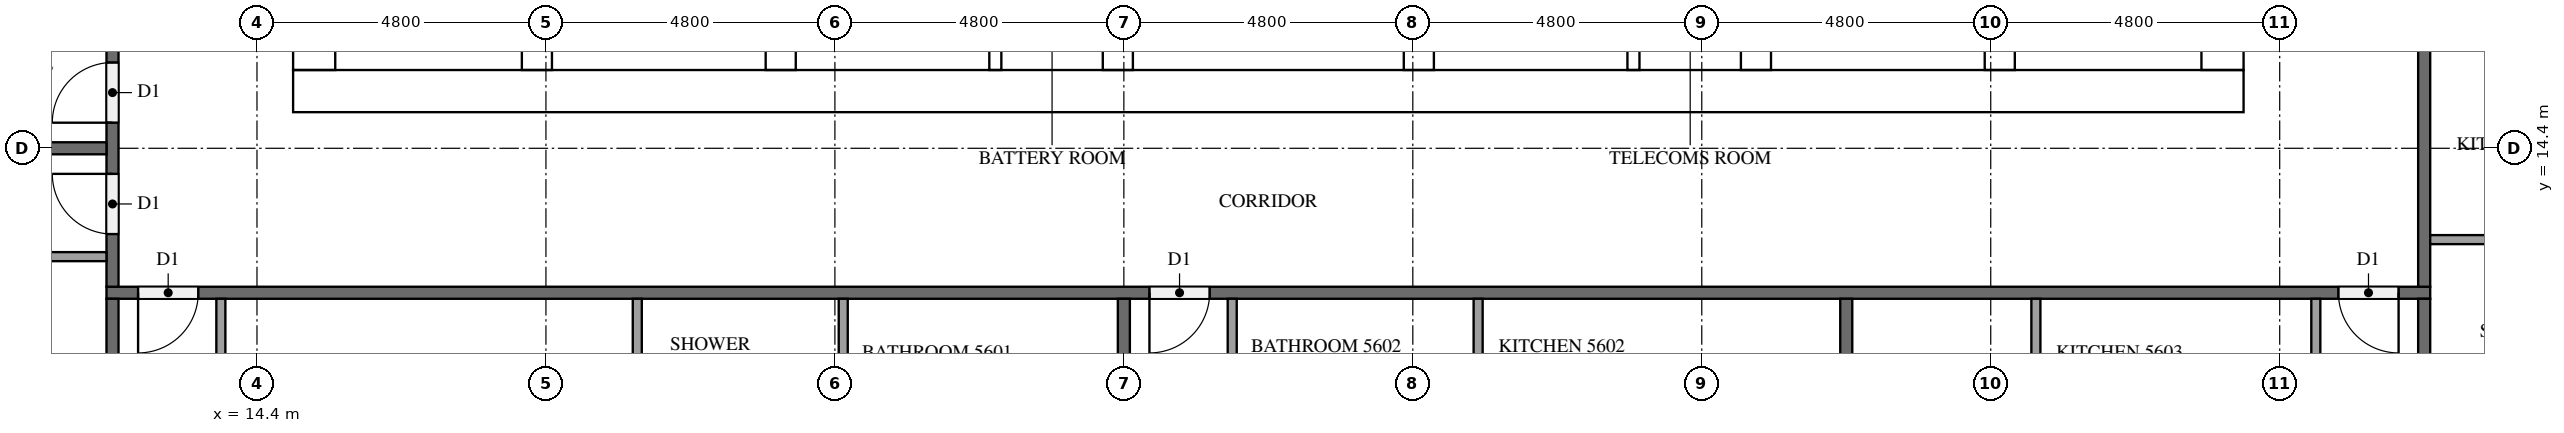
"""IFC4 building model, lengths in metres.
Left out: names, types, materials, properties, quantities, classifications, styles, units other than length and angle.
Written with IfcOpenShell. Run it as: python <this file> out.ifc"""

import sys

from ifc_helpers import new_model, si_unit, direction, frame, frame_2d, origin, place, context, subcontext, project, spatial, rectangle, extrude, element, fill, save


model = new_model("IFC4")
c1 = context("Model", 3, precision=1e-05, world=origin(), true_north=direction((0.0, 1.0)))
c2 = subcontext(c1, "Body", "Model", "MODEL_VIEW")
j1 = project(units=[si_unit("LENGTHUNIT", "METRE"), si_unit("PLANEANGLEUNIT", "RADIAN")], contexts=[c1])
p1 = place(None, origin())
s1 = spatial("IfcSite", under=j1, at=p1, CompositionType="ELEMENT")
p2 = place(p1, origin())
s2 = spatial("IfcBuilding", under=s1, at=p2, CompositionType="ELEMENT")
p3 = place(p2, frame((0.0, 0.0, 215.8)))
s3 = spatial("IfcBuildingStorey", under=s2, at=p3, CompositionType="ELEMENT", Elevation=215.8)
p4 = place(p3, frame((15.0, 15.35, 0.0), z_axis=(0.0, 0.0, 1.0), x_axis=(1.0, 0.0, 0.0)))
e1 = element("IfcWall", 1, at=p4, inside=s3, PredefinedType="SHEAR", context=c2, shape_type="SweptSolid", body=[
    extrude(rectangle(XDim=32.4, YDim=0.7, at=frame_2d((16.2, 0.0))), origin(), (0.0, 0.0, 1.0), 3.2),
])
p5 = place(p4, frame((15.3, 0.0, 0.0)))
e2 = element("IfcOpeningElement", 2, at=p5, cuts=e1, PredefinedType="OPENING", context=c2, shape_type="SweptSolid", body=[
    extrude(rectangle(XDim=1.8, YDim=2.1, at=frame_2d((0.9, 1.05))), frame((0.0, 0.36, 0.0), z_axis=(0.0, -1.0, 0.0), x_axis=(1.0, 0.0, 0.0)), (0.0, 0.0, 1.0), 0.72),
])
p6 = place(p3, frame((15.35, 15.7, 0.0), z_axis=(0.0, 0.0, 1.0), x_axis=(0.0, 1.0, 0.0)))
e3 = element("IfcWall", 3, at=p6, inside=s3, PredefinedType="SHEAR", context=c2, shape_type="SweptSolid", body=[
    extrude(rectangle(XDim=21.4, YDim=0.7, at=frame_2d((10.7, 0.0))), origin(), (0.0, 0.0, 1.0), 3.2),
])
p7 = place(p6, frame((5.06, 0.0, 0.0)))
e4 = element("IfcOpeningElement", 4, at=p7, cuts=e3, PredefinedType="OPENING", context=c2, shape_type="SweptSolid", body=[
    extrude(rectangle(XDim=1.2, YDim=2.1, at=frame_2d((0.6, 1.05))), frame((0.0, 0.36, 0.0), z_axis=(0.0, -1.0, 0.0), x_axis=(1.0, 0.0, 0.0)), (0.0, 0.0, 1.0), 0.72),
])
p8 = place(p3, frame((47.05, 15.7, 0.0), z_axis=(0.0, 0.0, 1.0), x_axis=(0.0, 1.0, 0.0)))
e5 = element("IfcWall", 5, at=p8, inside=s3, PredefinedType="SHEAR", context=c2, shape_type="SweptSolid", body=[
    extrude(rectangle(XDim=21.4, YDim=0.7, at=frame_2d((10.7, 0.0))), origin(), (0.0, 0.0, 1.0), 3.2),
])
p9 = place(p8, frame((10.4, 0.0, 0.0)))
e6 = element("IfcOpeningElement", 6, at=p9, cuts=e5, PredefinedType="OPENING", context=c2, shape_type="SweptSolid", body=[
    extrude(rectangle(XDim=1.2, YDim=2.1, at=frame_2d((0.6, 1.05))), frame((0.0, 0.36, 0.0), z_axis=(0.0, -1.0, 0.0), x_axis=(1.0, 0.0, 0.0)), (0.0, 0.0, 1.0), 0.72),
])
p10 = place(p3, frame((19.05, 15.7, 0.0), z_axis=(0.0, 0.0, 1.0), x_axis=(0.0, 1.0, 0.0)))
e7 = element("IfcWall", 7, at=p10, inside=s3, PredefinedType="SHEAR", context=c2, shape_type="SweptSolid", body=[
    extrude(rectangle(XDim=15.3, YDim=0.5, at=frame_2d((7.65, 0.0))), origin(), (0.0, 0.0, 1.0), 3.2),
])
p11 = place(p10, frame((9.75, 0.0, 0.0)))
e8 = element("IfcOpeningElement", 8, at=p11, cuts=e7, PredefinedType="OPENING", context=c2, shape_type="SweptSolid", body=[
    extrude(rectangle(XDim=1.1, YDim=2.1, at=frame_2d((0.55, 1.05))), frame((0.0, 0.26, 0.0), z_axis=(0.0, -1.0, 0.0), x_axis=(1.0, 0.0, 0.0)), (0.0, 0.0, 1.0), 0.52),
])
p12 = place(p10, frame((13.25, 0.0, 0.0)))
e9 = element("IfcOpeningElement", 9, at=p12, cuts=e7, PredefinedType="OPENING", context=c2, shape_type="SweptSolid", body=[
    extrude(rectangle(XDim=1.1, YDim=2.1, at=frame_2d((0.55, 1.05))), frame((0.0, 0.26, 0.0), z_axis=(0.0, -1.0, 0.0), x_axis=(1.0, 0.0, 0.0)), (0.0, 0.0, 1.0), 0.52),
])
p13 = place(p10, frame((0.5, 0.0, 0.0)))
e10 = element("IfcOpeningElement", 10, at=p13, cuts=e7, PredefinedType="OPENING", context=c2, shape_type="SweptSolid", body=[
    extrude(rectangle(XDim=1.2, YDim=2.1, at=frame_2d((0.6, 1.05))), frame((0.0, 0.26, 0.0), z_axis=(0.0, -1.0, 0.0), x_axis=(1.0, 0.0, 0.0)), (0.0, 0.0, 1.0), 0.52),
])
p14 = place(p3, frame((23.1, 15.7, 0.0), z_axis=(0.0, 0.0, 1.0), x_axis=(0.0, 1.0, 0.0)))
e11 = element("IfcWall", 11, at=p14, inside=s3, PredefinedType="SHEAR", context=c2, shape_type="SweptSolid", body=[
    extrude(rectangle(XDim=21.4, YDim=0.5, at=frame_2d((10.7, 0.0))), origin(), (0.0, 0.0, 1.0), 3.2),
])
p15 = place(p3, frame((39.3, 15.7, 0.0), z_axis=(0.0, 0.0, 1.0), x_axis=(0.0, 1.0, 0.0)))
e12 = element("IfcWall", 12, at=p15, inside=s3, PredefinedType="SHEAR", context=c2, shape_type="SweptSolid", body=[
    extrude(rectangle(XDim=8.55, YDim=0.5, at=frame_2d((4.275, 0.0))), origin(), (0.0, 0.0, 1.0), 3.2),
])
p16 = place(p3, frame((43.35, 15.7, 0.0), z_axis=(0.0, 0.0, 1.0), x_axis=(0.0, 1.0, 0.0)))
e13 = element("IfcWall", 13, at=p16, inside=s3, PredefinedType="SHEAR", context=c2, shape_type="SweptSolid", body=[
    extrude(rectangle(XDim=8.55, YDim=0.5, at=frame_2d((4.275, 0.0))), origin(), (0.0, 0.0, 1.0), 3.2),
])
p17 = place(p16, frame((0.5, 0.0, 0.0)))
e14 = element("IfcOpeningElement", 14, at=p17, cuts=e13, PredefinedType="OPENING", context=c2, shape_type="SweptSolid", body=[
    extrude(rectangle(XDim=1.2, YDim=2.1, at=frame_2d((0.6, 1.05))), frame((0.0, 0.26, 0.0), z_axis=(0.0, -1.0, 0.0), x_axis=(1.0, 0.0, 0.0)), (0.0, 0.0, 1.0), 0.52),
])
for number, where, z_axis, x_axis in (
    (15, (28.7, 15.7, 0.0), (0.0, 0.0, 1.0), (0.0, 1.0, 0.0)),
    (16, (33.7, 15.7, 0.0), (0.0, 0.0, 1.0), (0.0, 1.0, 0.0)),
):
    element("IfcWall", number, at=place(p3, frame(where, z_axis=z_axis, x_axis=x_axis)), inside=s3, PredefinedType="SHEAR", context=c2, shape_type="SweptSolid", body=[
        extrude(rectangle(XDim=2.8, YDim=0.5, at=frame_2d((1.4, 0.0))), origin(), (0.0, 0.0, 1.0), 3.2),
    ])
for number, where, z_axis, x_axis in (
    (17, (26.665, 15.7, 0.0), (0.0, 0.0, 1.0), (0.0, 1.0, 0.0)),
    (18, (37.265, 15.7, 0.0), (0.0, 0.0, 1.0), (0.0, 1.0, 0.0)),
):
    element("IfcWall", number, at=place(p3, frame(where, z_axis=z_axis, x_axis=x_axis)), inside=s3, PredefinedType="PARTITIONING", context=c2, shape_type="SweptSolid", body=[
        extrude(rectangle(XDim=2.8, YDim=0.2, at=frame_2d((1.4, 0.0))), origin(), (0.0, 0.0, 1.0), 3.2),
    ])
p18 = place(p3, frame((50.5, 12.0, 0.0), z_axis=(0.0, 0.0, 1.0), x_axis=(-1.0, 0.0, 0.0)))
e19 = element("IfcWall", 19, at=p18, inside=s3, PredefinedType="PARTITIONING", context=c2, shape_type="SweptSolid", body=[
    extrude(rectangle(XDim=38.6, YDim=0.2, at=frame_2d((19.3, 0.0))), origin(), (0.0, 0.0, 1.0), 3.2),
])
p19 = place(p18, frame((37.075, 0.0, 0.0)))
e20 = element("IfcOpeningElement", 20, at=p19, cuts=e19, PredefinedType="OPENING", context=c2, shape_type="SweptSolid", body=[
    extrude(rectangle(XDim=1.0, YDim=2.1, at=frame_2d((0.5, 1.05))), frame((0.0, 0.11, 0.0), z_axis=(0.0, -1.0, 0.0), x_axis=(1.0, 0.0, 0.0)), (0.0, 0.0, 1.0), 0.22),
])
p20 = place(p18, frame((20.275, 0.0, 0.0)))
e21 = element("IfcOpeningElement", 21, at=p20, cuts=e19, PredefinedType="OPENING", context=c2, shape_type="SweptSolid", body=[
    extrude(rectangle(XDim=1.0, YDim=2.1, at=frame_2d((0.5, 1.05))), frame((0.0, 0.11, 0.0), z_axis=(0.0, -1.0, 0.0), x_axis=(1.0, 0.0, 0.0)), (0.0, 0.0, 1.0), 0.22),
])
p21 = place(p18, frame((0.525, 0.0, 0.0)))
e22 = element("IfcOpeningElement", 22, at=p21, cuts=e19, PredefinedType="OPENING", context=c2, shape_type="SweptSolid", body=[
    extrude(rectangle(XDim=1.0, YDim=2.1, at=frame_2d((0.5, 1.05))), frame((0.0, 0.11, 0.0), z_axis=(0.0, -1.0, 0.0), x_axis=(1.0, 0.0, 0.0)), (0.0, 0.0, 1.0), 0.22),
])
p22 = place(p3, frame((50.4, 40.7, 0.0), z_axis=(0.0, 0.0, 1.0), x_axis=(0.0, -1.0, 0.0)))
e23 = element("IfcWall", 23, at=p22, inside=s3, PredefinedType="PARTITIONING", context=c2, shape_type="SweptSolid", body=[
    extrude(rectangle(XDim=28.6, YDim=0.2, at=frame_2d((14.3, 0.0))), origin(), (0.0, 0.0, 1.0), 3.2),
])
p23 = place(p22, frame((19.525, 0.0, 0.0)))
e24 = element("IfcOpeningElement", 24, at=p23, cuts=e23, PredefinedType="OPENING", context=c2, shape_type="SweptSolid", body=[
    extrude(rectangle(XDim=1.0, YDim=2.1, at=frame_2d((0.5, 1.05))), frame((0.0, 0.11, 0.0), z_axis=(0.0, -1.0, 0.0), x_axis=(1.0, 0.0, 0.0)), (0.0, 0.0, 1.0), 0.22),
])
p24 = place(p22, frame((7.525, 0.0, 0.0)))
e25 = element("IfcOpeningElement", 25, at=p24, cuts=e23, PredefinedType="OPENING", context=c2, shape_type="SweptSolid", body=[
    extrude(rectangle(XDim=1.0, YDim=2.1, at=frame_2d((0.5, 1.05))), frame((0.0, 0.11, 0.0), z_axis=(0.0, -1.0, 0.0), x_axis=(1.0, 0.0, 0.0)), (0.0, 0.0, 1.0), 0.22),
])
p25 = place(p22, frame((0.325, 0.0, 0.0)))
e26 = element("IfcOpeningElement", 26, at=p25, cuts=e23, PredefinedType="OPENING", context=c2, shape_type="SweptSolid", body=[
    extrude(rectangle(XDim=1.0, YDim=2.1, at=frame_2d((0.5, 1.05))), frame((0.0, 0.11, 0.0), z_axis=(0.0, -1.0, 0.0), x_axis=(1.0, 0.0, 0.0)), (0.0, 0.0, 1.0), 0.22),
])
p26 = place(p3, frame((12.0, 12.1, 0.0), z_axis=(0.0, 0.0, 1.0), x_axis=(0.0, 1.0, 0.0)))
e27 = element("IfcWall", 27, at=p26, inside=s3, PredefinedType="PARTITIONING", context=c2, shape_type="SweptSolid", body=[
    extrude(rectangle(XDim=28.6, YDim=0.2, at=frame_2d((14.3, 0.0))), origin(), (0.0, 0.0, 1.0), 3.2),
])
p27 = place(p26, frame((27.275, 0.0, 0.0)))
e28 = element("IfcOpeningElement", 28, at=p27, cuts=e27, PredefinedType="OPENING", context=c2, shape_type="SweptSolid", body=[
    extrude(rectangle(XDim=1.0, YDim=2.1, at=frame_2d((0.5, 1.05))), frame((0.0, 0.11, 0.0), z_axis=(0.0, -1.0, 0.0), x_axis=(1.0, 0.0, 0.0)), (0.0, 0.0, 1.0), 0.22),
])
p28 = place(p26, frame((12.325, 0.0, 0.0)))
e29 = element("IfcOpeningElement", 29, at=p28, cuts=e27, PredefinedType="OPENING", context=c2, shape_type="SweptSolid", body=[
    extrude(rectangle(XDim=1.0, YDim=2.1, at=frame_2d((0.5, 1.05))), frame((0.0, 0.11, 0.0), z_axis=(0.0, -1.0, 0.0), x_axis=(1.0, 0.0, 0.0)), (0.0, 0.0, 1.0), 0.22),
])
p29 = place(p26, frame((2.725, 0.0, 0.0)))
e30 = element("IfcOpeningElement", 30, at=p29, cuts=e27, PredefinedType="OPENING", context=c2, shape_type="SweptSolid", body=[
    extrude(rectangle(XDim=1.0, YDim=2.1, at=frame_2d((0.5, 1.05))), frame((0.0, 0.11, 0.0), z_axis=(0.0, -1.0, 0.0), x_axis=(1.0, 0.0, 0.0)), (0.0, 0.0, 1.0), 0.22),
])
p30 = place(p26, frame((0.875, 0.0, 0.0)))
e31 = element("IfcOpeningElement", 31, at=p30, cuts=e27, PredefinedType="OPENING", context=c2, shape_type="SweptSolid", body=[
    extrude(rectangle(XDim=1.0, YDim=2.1, at=frame_2d((0.5, 1.05))), frame((0.0, 0.11, 0.0), z_axis=(0.0, -1.0, 0.0), x_axis=(1.0, 0.0, 0.0)), (0.0, 0.0, 1.0), 0.22),
])
p31 = place(p3, frame((28.8, 11.9, 0.0), z_axis=(0.0, 0.0, 1.0), x_axis=(0.0, -1.0, 0.0)))
e32 = element("IfcWall", 32, at=p31, inside=s3, PredefinedType="PARTITIONING", context=c2, shape_type="SweptSolid", body=[
    extrude(rectangle(XDim=6.775, YDim=0.2, at=frame_2d((3.387, 0.0))), origin(), (0.0, 0.0, 1.0), 3.2),
])
for number, where, z_axis, x_axis in (
    (33, (12.0, 4.9, 0.0), (0.0, 0.0, 1.0), (0.0, 1.0, 0.0)),
    (34, (40.8, 11.9, 0.0), (0.0, 0.0, 1.0), (0.0, -1.0, 0.0)),
    (35, (50.4, 11.9, 0.0), (0.0, 0.0, 1.0), (0.0, -1.0, 0.0)),
    (36, (4.9, 14.4, 0.0), (0.0, 0.0, 1.0), (1.0, 0.0, 0.0)),
):
    element("IfcWall", number, at=place(p3, frame(where, z_axis=z_axis, x_axis=x_axis)), inside=s3, PredefinedType="PARTITIONING", context=c2, shape_type="SweptSolid", body=[
        extrude(rectangle(XDim=7.0, YDim=0.2, at=frame_2d((3.5, 0.0))), origin(), (0.0, 0.0, 1.0), 3.2),
    ])
for number, where, z_axis, x_axis in (
    (37, (20.717, 11.9, 0.0), (0.0, 0.0, 1.0), (0.0, -1.0, 0.0)),
    (38, (24.138, 11.9, 0.0), (0.0, 0.0, 1.0), (0.0, -1.0, 0.0)),
):
    element("IfcWall", number, at=place(p3, frame(where, z_axis=z_axis, x_axis=x_axis)), inside=s3, PredefinedType="PARTITIONING", context=c2, shape_type="SweptSolid", body=[
        extrude(rectangle(XDim=2.225, YDim=0.15, at=frame_2d((1.112, 0.0))), origin(), (0.0, 0.0, 1.0), 3.2),
    ])
p32 = place(p3, frame((13.8, 11.9, 0.0), z_axis=(0.0, 0.0, 1.0), x_axis=(0.0, -1.0, 0.0)))
e39 = element("IfcWall", 39, at=p32, inside=s3, PredefinedType="PARTITIONING", context=c2, shape_type="SweptSolid", body=[
    extrude(rectangle(XDim=2.375, YDim=0.15, at=frame_2d((1.188, 0.0))), origin(), (0.0, 0.0, 1.0), 3.2),
])
p33 = place(p3, frame((34.685, 11.9, 0.0), z_axis=(0.0, 0.0, 1.0), x_axis=(0.0, -1.0, 0.0)))
e40 = element("IfcWall", 40, at=p33, inside=s3, PredefinedType="PARTITIONING", context=c2, shape_type="SweptSolid", body=[
    extrude(rectangle(XDim=1.775, YDim=0.15, at=frame_2d((0.887, 0.0))), origin(), (0.0, 0.0, 1.0), 3.2),
])
p34 = place(p3, frame((30.6, 11.9, 0.0), z_axis=(0.0, 0.0, 1.0), x_axis=(0.0, -1.0, 0.0)))
e41 = element("IfcWall", 41, at=p34, inside=s3, PredefinedType="PARTITIONING", context=c2, shape_type="SweptSolid", body=[
    extrude(rectangle(XDim=1.925, YDim=0.15, at=frame_2d((0.962, 0.0))), origin(), (0.0, 0.0, 1.0), 3.2),
])
p35 = place(p3, frame((43.95, 11.9, 0.0), z_axis=(0.0, 0.0, 1.0), x_axis=(0.0, -1.0, 0.0)))
e42 = element("IfcWall", 42, at=p35, inside=s3, PredefinedType="PARTITIONING", context=c2, shape_type="SweptSolid", body=[
    extrude(rectangle(XDim=2.225, YDim=0.15, at=frame_2d((1.112, 0.0))), origin(), (0.0, 0.0, 1.0), 3.2),
])
p36 = place(p3, frame((48.6, 11.9, 0.0), z_axis=(0.0, 0.0, 1.0), x_axis=(0.0, -1.0, 0.0)))
e43 = element("IfcWall", 43, at=p36, inside=s3, PredefinedType="PARTITIONING", context=c2, shape_type="SweptSolid", body=[
    extrude(rectangle(XDim=2.375, YDim=0.15, at=frame_2d((1.188, 0.0))), origin(), (0.0, 0.0, 1.0), 3.2),
])
p37 = place(p3, frame((50.5, 12.883, 0.0), z_axis=(0.0, 0.0, 1.0), x_axis=(1.0, 0.0, 0.0)))
e44 = element("IfcWall", 44, at=p37, inside=s3, PredefinedType="PARTITIONING", context=c2, shape_type="SweptSolid", body=[
    extrude(rectangle(XDim=2.975, YDim=0.15, at=frame_2d((1.488, 0.0))), origin(), (0.0, 0.0, 1.0), 3.2),
])
p38 = place(p3, frame((11.9, 12.6, 0.0), z_axis=(0.0, 0.0, 1.0), x_axis=(-1.0, 0.0, 0.0)))
e45 = element("IfcWall", 45, at=p38, inside=s3, PredefinedType="PARTITIONING", context=c2, shape_type="SweptSolid", body=[
    extrude(rectangle(XDim=2.225, YDim=0.15, at=frame_2d((1.112, 0.0))), origin(), (0.0, 0.0, 1.0), 3.2),
])
p39 = place(p5, frame((1.8, 0.0, 0.0), z_axis=(0.0, 0.0, 1.0), x_axis=(-1.0, 0.0, 0.0)))
e46 = element("IfcDoor", 46, at=p39, inside=s3, OperationType="DOUBLE_DOOR_SINGLE_SWING", PredefinedType="DOOR", context=c2, shape_type="SweptSolid", body=[
    extrude(rectangle(XDim=1.8, YDim=2.1, at=frame_2d((0.9, 1.05))), frame((0.0, 0.025, 0.0), z_axis=(0.0, -1.0, 0.0), x_axis=(1.0, 0.0, 0.0)), (0.0, 0.0, 1.0), 0.05),
])
fill(e2, e46)
p40 = place(p19, origin())
e47 = element("IfcDoor", 47, at=p40, inside=s3, OperationType="SINGLE_SWING_RIGHT", PredefinedType="DOOR", context=c2, shape_type="SweptSolid", body=[
    extrude(rectangle(XDim=1.0, YDim=2.1, at=frame_2d((0.5, 1.05))), frame((0.0, 0.025, 0.0), z_axis=(0.0, -1.0, 0.0), x_axis=(1.0, 0.0, 0.0)), (0.0, 0.0, 1.0), 0.05),
])
fill(e20, e47)
p41 = place(p20, origin())
e48 = element("IfcDoor", 48, at=p41, inside=s3, OperationType="SINGLE_SWING_RIGHT", PredefinedType="DOOR", context=c2, shape_type="SweptSolid", body=[
    extrude(rectangle(XDim=1.0, YDim=2.1, at=frame_2d((0.5, 1.05))), frame((0.0, 0.025, 0.0), z_axis=(0.0, -1.0, 0.0), x_axis=(1.0, 0.0, 0.0)), (0.0, 0.0, 1.0), 0.05),
])
fill(e21, e48)
p42 = place(p21, origin())
e49 = element("IfcDoor", 49, at=p42, inside=s3, OperationType="SINGLE_SWING_LEFT", PredefinedType="DOOR", context=c2, shape_type="SweptSolid", body=[
    extrude(rectangle(XDim=1.0, YDim=2.1, at=frame_2d((0.5, 1.05))), frame((0.0, 0.025, 0.0), z_axis=(0.0, -1.0, 0.0), x_axis=(1.0, 0.0, 0.0)), (0.0, 0.0, 1.0), 0.05),
])
fill(e22, e49)
p43 = place(p29, origin())
e50 = element("IfcDoor", 50, at=p43, inside=s3, OperationType="SINGLE_SWING_LEFT", PredefinedType="DOOR", context=c2, shape_type="SweptSolid", body=[
    extrude(rectangle(XDim=1.0, YDim=2.1, at=frame_2d((0.5, 1.05))), frame((0.0, 0.025, 0.0), z_axis=(0.0, -1.0, 0.0), x_axis=(1.0, 0.0, 0.0)), (0.0, 0.0, 1.0), 0.05),
])
fill(e30, e50)
p44 = place(p30, origin())
e51 = element("IfcDoor", 51, at=p44, inside=s3, OperationType="SINGLE_SWING_RIGHT", PredefinedType="DOOR", context=c2, shape_type="SweptSolid", body=[
    extrude(rectangle(XDim=1.0, YDim=2.1, at=frame_2d((0.5, 1.05))), frame((0.0, 0.025, 0.0), z_axis=(0.0, -1.0, 0.0), x_axis=(1.0, 0.0, 0.0)), (0.0, 0.0, 1.0), 0.05),
])
fill(e31, e51)
save(model, sys.argv[1])
